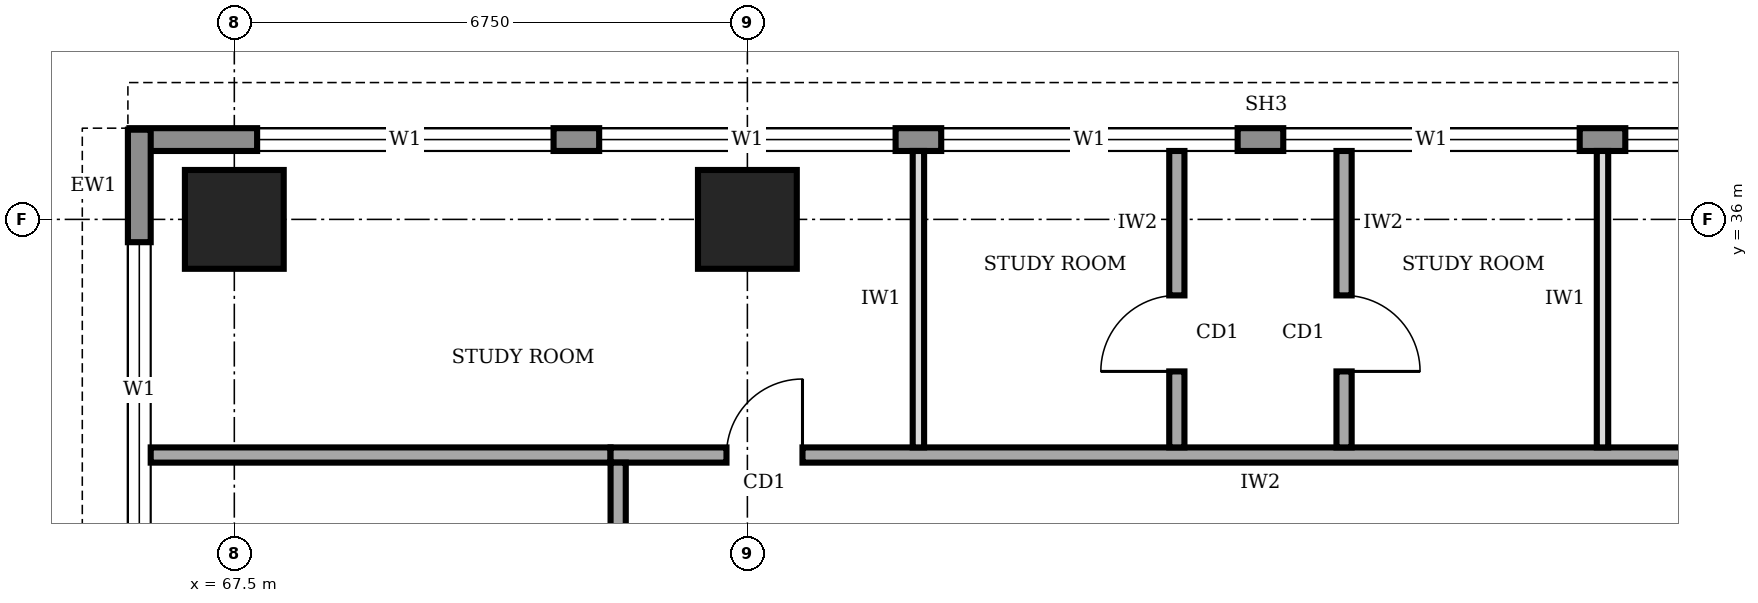
"""IFC4 building model, lengths in metres.
Left out: names, types, materials, properties, quantities, classifications, styles, units other than length and angle.
Written with IfcOpenShell. Run it as: python <this file> out.ifc"""

import sys

from ifc_helpers import new_model, si_unit, direction, frame, frame_2d, origin, origin_2d, place, context, subcontext, project, spatial, rectangle, extrude, element, fill, save


model = new_model("IFC4")
c1 = context("Model", 3, precision=1e-05, world=origin(), true_north=direction((0.0, 1.0)))
c2 = subcontext(c1, "Body", "Model", "MODEL_VIEW")
j1 = project(units=[si_unit("LENGTHUNIT", "METRE"), si_unit("PLANEANGLEUNIT", "RADIAN")], contexts=[c1])
p1 = place(None, origin())
s1 = spatial("IfcSite", under=j1, at=p1, CompositionType="ELEMENT")
p2 = place(p1, origin())
s2 = spatial("IfcBuilding", under=s1, at=p2, CompositionType="ELEMENT")
p3 = place(p2, frame((0.0, 0.0, 221.0)))
s3 = spatial("IfcBuildingStorey", under=s2, at=p3, CompositionType="ELEMENT", Elevation=221.0)
for number, where, z_axis, x_axis in (
    (1, (67.5, 36.0, 0.0), (0.0, 0.0, 1.0), (1.0, 0.0, 0.0)),
    (2, (74.25, 36.0, 0.0), (0.0, 0.0, 1.0), (1.0, 0.0, 0.0)),
):
    element("IfcColumn", number, at=place(p3, frame(where, z_axis=z_axis, x_axis=x_axis)), inside=s3, PredefinedType="COLUMN", context=c2, shape_type="SweptSolid", body=[
        extrude(rectangle(XDim=1.3, YDim=1.3, at=origin_2d()), origin(), (0.0, 0.0, 1.0), 4.0),
    ])
p4 = place(p3, frame((96.03, 37.05, 0.0), z_axis=(0.0, 0.0, 1.0), x_axis=(-1.0, 0.0, 0.0)))
e3 = element("IfcWall", 3, at=p4, inside=s3, PredefinedType="STANDARD", context=c2, shape_type="SweptSolid", body=[
    extrude(rectangle(XDim=29.91, YDim=0.3, at=frame_2d((14.955, 0.0))), origin(), (0.0, 0.0, 1.0), 3.75),
])
p5 = place(p4, frame((24.33, 0.0, 0.9)))
e4 = element("IfcOpeningElement", 4, at=p5, cuts=e3, PredefinedType="OPENING", context=c2, shape_type="SweptSolid", body=[
    extrude(rectangle(XDim=3.9, YDim=2.2, at=frame_2d((1.95, 1.1))), frame((0.0, 0.16, 0.0), z_axis=(0.0, -1.0, 0.0), x_axis=(1.0, 0.0, 0.0)), (0.0, 0.0, 1.0), 0.32),
])
p6 = place(p4, frame((19.83, 0.0, 0.9)))
e5 = element("IfcOpeningElement", 5, at=p6, cuts=e3, PredefinedType="OPENING", context=c2, shape_type="SweptSolid", body=[
    extrude(rectangle(XDim=3.9, YDim=2.2, at=frame_2d((1.95, 1.1))), frame((0.0, 0.16, 0.0), z_axis=(0.0, -1.0, 0.0), x_axis=(1.0, 0.0, 0.0)), (0.0, 0.0, 1.0), 0.32),
])
p7 = place(p4, frame((15.33, 0.0, 0.9)))
e6 = element("IfcOpeningElement", 6, at=p7, cuts=e3, PredefinedType="OPENING", context=c2, shape_type="SweptSolid", body=[
    extrude(rectangle(XDim=3.9, YDim=2.2, at=frame_2d((1.95, 1.1))), frame((0.0, 0.16, 0.0), z_axis=(0.0, -1.0, 0.0), x_axis=(1.0, 0.0, 0.0)), (0.0, 0.0, 1.0), 0.32),
])
p8 = place(p4, frame((10.83, 0.0, 0.9)))
e7 = element("IfcOpeningElement", 7, at=p8, cuts=e3, PredefinedType="OPENING", context=c2, shape_type="SweptSolid", body=[
    extrude(rectangle(XDim=3.9, YDim=2.2, at=frame_2d((1.95, 1.1))), frame((0.0, 0.16, 0.0), z_axis=(0.0, -1.0, 0.0), x_axis=(1.0, 0.0, 0.0)), (0.0, 0.0, 1.0), 0.32),
])
p9 = place(p4, frame((6.33, 0.0, 0.9)))
e8 = element("IfcOpeningElement", 8, at=p9, cuts=e3, PredefinedType="OPENING", context=c2, shape_type="SweptSolid", body=[
    extrude(rectangle(XDim=3.9, YDim=2.2, at=frame_2d((1.95, 1.1))), frame((0.0, 0.16, 0.0), z_axis=(0.0, -1.0, 0.0), x_axis=(1.0, 0.0, 0.0)), (0.0, 0.0, 1.0), 0.32),
])
p10 = place(p4, frame((1.83, 0.0, 0.9)))
e9 = element("IfcOpeningElement", 9, at=p10, cuts=e3, PredefinedType="OPENING", context=c2, shape_type="SweptSolid", body=[
    extrude(rectangle(XDim=3.9, YDim=2.2, at=frame_2d((1.95, 1.1))), frame((0.0, 0.16, 0.0), z_axis=(0.0, -1.0, 0.0), x_axis=(1.0, 0.0, 0.0)), (0.0, 0.0, 1.0), 0.32),
])
p11 = place(p3, frame((66.25, 37.18, 0.0), z_axis=(0.0, 0.0, 1.0), x_axis=(0.0, -1.0, 0.0)))
e10 = element("IfcWall", 10, at=p11, inside=s3, PredefinedType="STANDARD", context=c2, shape_type="SweptSolid", body=[
    extrude(rectangle(XDim=33.86, YDim=0.3, at=frame_2d((16.93, 0.0))), origin(), (0.0, 0.0, 1.0), 3.75),
])
p12 = place(p11, frame((28.48, 0.0, 0.9)))
e11 = element("IfcOpeningElement", 11, at=p12, cuts=e10, PredefinedType="OPENING", context=c2, shape_type="SweptSolid", body=[
    extrude(rectangle(XDim=3.9, YDim=2.2, at=frame_2d((1.95, 1.1))), frame((0.0, 0.16, 0.0), z_axis=(0.0, -1.0, 0.0), x_axis=(1.0, 0.0, 0.0)), (0.0, 0.0, 1.0), 0.32),
])
p13 = place(p11, frame((23.98, 0.0, 0.9)))
e12 = element("IfcOpeningElement", 12, at=p13, cuts=e10, PredefinedType="OPENING", context=c2, shape_type="SweptSolid", body=[
    extrude(rectangle(XDim=3.9, YDim=2.2, at=frame_2d((1.95, 1.1))), frame((0.0, 0.16, 0.0), z_axis=(0.0, -1.0, 0.0), x_axis=(1.0, 0.0, 0.0)), (0.0, 0.0, 1.0), 0.32),
])
p14 = place(p11, frame((19.48, 0.0, 0.9)))
e13 = element("IfcOpeningElement", 13, at=p14, cuts=e10, PredefinedType="OPENING", context=c2, shape_type="SweptSolid", body=[
    extrude(rectangle(XDim=3.9, YDim=2.2, at=frame_2d((1.95, 1.1))), frame((0.0, 0.16, 0.0), z_axis=(0.0, -1.0, 0.0), x_axis=(1.0, 0.0, 0.0)), (0.0, 0.0, 1.0), 0.32),
])
p15 = place(p11, frame((14.98, 0.0, 0.9)))
e14 = element("IfcOpeningElement", 14, at=p15, cuts=e10, PredefinedType="OPENING", context=c2, shape_type="SweptSolid", body=[
    extrude(rectangle(XDim=3.9, YDim=2.2, at=frame_2d((1.95, 1.1))), frame((0.0, 0.16, 0.0), z_axis=(0.0, -1.0, 0.0), x_axis=(1.0, 0.0, 0.0)), (0.0, 0.0, 1.0), 0.32),
])
p16 = place(p11, frame((10.48, 0.0, 0.9)))
e15 = element("IfcOpeningElement", 15, at=p16, cuts=e10, PredefinedType="OPENING", context=c2, shape_type="SweptSolid", body=[
    extrude(rectangle(XDim=3.9, YDim=2.2, at=frame_2d((1.95, 1.1))), frame((0.0, 0.16, 0.0), z_axis=(0.0, -1.0, 0.0), x_axis=(1.0, 0.0, 0.0)), (0.0, 0.0, 1.0), 0.32),
])
p17 = place(p11, frame((5.98, 0.0, 0.9)))
e16 = element("IfcOpeningElement", 16, at=p17, cuts=e10, PredefinedType="OPENING", context=c2, shape_type="SweptSolid", body=[
    extrude(rectangle(XDim=3.9, YDim=2.2, at=frame_2d((1.95, 1.1))), frame((0.0, 0.16, 0.0), z_axis=(0.0, -1.0, 0.0), x_axis=(1.0, 0.0, 0.0)), (0.0, 0.0, 1.0), 0.32),
])
p18 = place(p11, frame((1.48, 0.0, 0.9)))
e17 = element("IfcOpeningElement", 17, at=p18, cuts=e10, PredefinedType="OPENING", context=c2, shape_type="SweptSolid", body=[
    extrude(rectangle(XDim=3.9, YDim=2.2, at=frame_2d((1.95, 1.1))), frame((0.0, 0.16, 0.0), z_axis=(0.0, -1.0, 0.0), x_axis=(1.0, 0.0, 0.0)), (0.0, 0.0, 1.0), 0.32),
])
p19 = place(p3, frame((89.35, 32.9, 0.0), z_axis=(0.0, 0.0, 1.0), x_axis=(-1.0, 0.0, 0.0)))
e18 = element("IfcWall", 18, at=p19, inside=s3, PredefinedType="SOLIDWALL", context=c2, shape_type="SweptSolid", body=[
    extrude(rectangle(XDim=16.9, YDim=0.2, at=frame_2d((8.45, 0.0))), origin(), (0.0, 0.0, 1.0), 3.75),
])
p20 = place(p19, frame((14.375, 0.0, 0.0)))
e19 = element("IfcOpeningElement", 19, at=p20, cuts=e18, PredefinedType="OPENING", context=c2, shape_type="SweptSolid", body=[
    extrude(rectangle(XDim=1.0, YDim=2.1, at=frame_2d((0.5, 1.05))), frame((0.0, 0.11, 0.0), z_axis=(0.0, -1.0, 0.0), x_axis=(1.0, 0.0, 0.0)), (0.0, 0.0, 1.0), 0.22),
])
p21 = place(p19, frame((1.325, 0.0, 0.0)))
e20 = element("IfcOpeningElement", 20, at=p21, cuts=e18, PredefinedType="OPENING", context=c2, shape_type="SweptSolid", body=[
    extrude(rectangle(XDim=1.0, YDim=2.1, at=frame_2d((0.5, 1.05))), frame((0.0, 0.11, 0.0), z_axis=(0.0, -1.0, 0.0), x_axis=(1.0, 0.0, 0.0)), (0.0, 0.0, 1.0), 0.22),
])
p22 = place(p3, frame((72.55, 32.8, 0.0), z_axis=(0.0, 0.0, 1.0), x_axis=(0.0, -1.0, 0.0)))
e21 = element("IfcWall", 21, at=p22, inside=s3, PredefinedType="SOLIDWALL", context=c2, shape_type="SweptSolid", body=[
    extrude(rectangle(XDim=23.8, YDim=0.2, at=frame_2d((11.9, 0.0))), origin(), (0.0, 0.0, 1.0), 3.75),
])
p23 = place(p22, frame((21.05, 0.0, 0.0)))
e22 = element("IfcOpeningElement", 22, at=p23, cuts=e21, PredefinedType="OPENING", context=c2, shape_type="SweptSolid", body=[
    extrude(rectangle(XDim=1.0, YDim=2.1, at=frame_2d((0.5, 1.05))), frame((0.0, 0.11, 0.0), z_axis=(0.0, -1.0, 0.0), x_axis=(1.0, 0.0, 0.0)), (0.0, 0.0, 1.0), 0.22),
])
p24 = place(p22, frame((14.3, 0.0, 0.0)))
e23 = element("IfcOpeningElement", 23, at=p24, cuts=e21, PredefinedType="OPENING", context=c2, shape_type="SweptSolid", body=[
    extrude(rectangle(XDim=1.0, YDim=2.1, at=frame_2d((0.5, 1.05))), frame((0.0, 0.11, 0.0), z_axis=(0.0, -1.0, 0.0), x_axis=(1.0, 0.0, 0.0)), (0.0, 0.0, 1.0), 0.22),
])
p25 = place(p22, frame((7.55, 0.0, 0.0)))
e24 = element("IfcOpeningElement", 24, at=p25, cuts=e21, PredefinedType="OPENING", context=c2, shape_type="SweptSolid", body=[
    extrude(rectangle(XDim=1.0, YDim=2.1, at=frame_2d((0.5, 1.05))), frame((0.0, 0.11, 0.0), z_axis=(0.0, -1.0, 0.0), x_axis=(1.0, 0.0, 0.0)), (0.0, 0.0, 1.0), 0.22),
])
p26 = place(p22, frame((2.3, 0.0, 0.0)))
e25 = element("IfcOpeningElement", 25, at=p26, cuts=e21, PredefinedType="OPENING", context=c2, shape_type="SweptSolid", body=[
    extrude(rectangle(XDim=1.0, YDim=2.1, at=frame_2d((0.5, 1.05))), frame((0.0, 0.11, 0.0), z_axis=(0.0, -1.0, 0.0), x_axis=(1.0, 0.0, 0.0)), (0.0, 0.0, 1.0), 0.22),
])
p27 = place(p3, frame((79.9, 33.0, 0.0), z_axis=(0.0, 0.0, 1.0), x_axis=(0.0, 1.0, 0.0)))
e26 = element("IfcWall", 26, at=p27, inside=s3, PredefinedType="SOLIDWALL", context=c2, shape_type="SweptSolid", body=[
    extrude(rectangle(XDim=3.9, YDim=0.2, at=frame_2d((1.95, 0.0))), origin(), (0.0, 0.0, 1.0), 3.75),
])
p28 = place(p27, frame((1.0, 0.0, 0.0)))
e27 = element("IfcOpeningElement", 27, at=p28, cuts=e26, PredefinedType="OPENING", context=c2, shape_type="SweptSolid", body=[
    extrude(rectangle(XDim=1.0, YDim=2.1, at=frame_2d((0.5, 1.05))), frame((0.0, 0.11, 0.0), z_axis=(0.0, -1.0, 0.0), x_axis=(1.0, 0.0, 0.0)), (0.0, 0.0, 1.0), 0.22),
])
p29 = place(p3, frame((82.1, 36.9, 0.0), z_axis=(0.0, 0.0, 1.0), x_axis=(0.0, -1.0, 0.0)))
e28 = element("IfcWall", 28, at=p29, inside=s3, PredefinedType="SOLIDWALL", context=c2, shape_type="SweptSolid", body=[
    extrude(rectangle(XDim=3.9, YDim=0.2, at=frame_2d((1.95, 0.0))), origin(), (0.0, 0.0, 1.0), 3.75),
])
p30 = place(p29, frame((1.9, 0.0, 0.0)))
e29 = element("IfcOpeningElement", 29, at=p30, cuts=e28, PredefinedType="OPENING", context=c2, shape_type="SweptSolid", body=[
    extrude(rectangle(XDim=1.0, YDim=2.1, at=frame_2d((0.5, 1.05))), frame((0.0, 0.11, 0.0), z_axis=(0.0, -1.0, 0.0), x_axis=(1.0, 0.0, 0.0)), (0.0, 0.0, 1.0), 0.22),
])
p31 = place(p3, frame((66.4, 32.9, 0.0), z_axis=(0.0, 0.0, 1.0), x_axis=(1.0, 0.0, 0.0)))
e30 = element("IfcWall", 30, at=p31, inside=s3, PredefinedType="SOLIDWALL", context=c2, shape_type="SweptSolid", body=[
    extrude(rectangle(XDim=6.05, YDim=0.2, at=frame_2d((3.025, 0.0))), origin(), (0.0, 0.0, 1.0), 3.75),
])
for number, where, z_axis, x_axis in (
    (31, (76.5, 33.0, 0.0), (0.0, 0.0, 1.0), (0.0, 1.0, 0.0)),
    (32, (85.5, 33.0, 0.0), (0.0, 0.0, 1.0), (0.0, 1.0, 0.0)),
):
    element("IfcWall", number, at=place(p3, frame(where, z_axis=z_axis, x_axis=x_axis)), inside=s3, PredefinedType="PARTITIONING", context=c2, shape_type="SweptSolid", body=[
        extrude(rectangle(XDim=3.9, YDim=0.15, at=frame_2d((1.95, 0.0))), origin(), (0.0, 0.0, 1.0), 3.75),
    ])
p32 = place(p5, origin())
e33 = element("IfcWindow", 33, at=p32, inside=s3, PartitioningType="SINGLE_PANEL", PredefinedType="WINDOW", context=c2, shape_type="SweptSolid", body=[
    extrude(rectangle(XDim=3.9, YDim=2.2, at=frame_2d((1.95, 1.1))), frame((0.0, 0.03, 0.0), z_axis=(0.0, -1.0, 0.0), x_axis=(1.0, 0.0, 0.0)), (0.0, 0.0, 1.0), 0.06),
])
fill(e4, e33)
p33 = place(p6, origin())
e34 = element("IfcWindow", 34, at=p33, inside=s3, PartitioningType="SINGLE_PANEL", PredefinedType="WINDOW", context=c2, shape_type="SweptSolid", body=[
    extrude(rectangle(XDim=3.9, YDim=2.2, at=frame_2d((1.95, 1.1))), frame((0.0, 0.03, 0.0), z_axis=(0.0, -1.0, 0.0), x_axis=(1.0, 0.0, 0.0)), (0.0, 0.0, 1.0), 0.06),
])
fill(e5, e34)
p34 = place(p7, origin())
e35 = element("IfcWindow", 35, at=p34, inside=s3, PartitioningType="SINGLE_PANEL", PredefinedType="WINDOW", context=c2, shape_type="SweptSolid", body=[
    extrude(rectangle(XDim=3.9, YDim=2.2, at=frame_2d((1.95, 1.1))), frame((0.0, 0.03, 0.0), z_axis=(0.0, -1.0, 0.0), x_axis=(1.0, 0.0, 0.0)), (0.0, 0.0, 1.0), 0.06),
])
fill(e6, e35)
p35 = place(p8, origin())
e36 = element("IfcWindow", 36, at=p35, inside=s3, PartitioningType="SINGLE_PANEL", PredefinedType="WINDOW", context=c2, shape_type="SweptSolid", body=[
    extrude(rectangle(XDim=3.9, YDim=2.2, at=frame_2d((1.95, 1.1))), frame((0.0, 0.03, 0.0), z_axis=(0.0, -1.0, 0.0), x_axis=(1.0, 0.0, 0.0)), (0.0, 0.0, 1.0), 0.06),
])
fill(e7, e36)
p36 = place(p9, origin())
e37 = element("IfcWindow", 37, at=p36, inside=s3, PartitioningType="SINGLE_PANEL", PredefinedType="WINDOW", context=c2, shape_type="SweptSolid", body=[
    extrude(rectangle(XDim=3.9, YDim=2.2, at=frame_2d((1.95, 1.1))), frame((0.0, 0.03, 0.0), z_axis=(0.0, -1.0, 0.0), x_axis=(1.0, 0.0, 0.0)), (0.0, 0.0, 1.0), 0.06),
])
fill(e8, e37)
p37 = place(p18, origin())
e38 = element("IfcWindow", 38, at=p37, inside=s3, PartitioningType="SINGLE_PANEL", PredefinedType="WINDOW", context=c2, shape_type="SweptSolid", body=[
    extrude(rectangle(XDim=3.9, YDim=2.2, at=frame_2d((1.95, 1.1))), frame((0.0, 0.03, 0.0), z_axis=(0.0, -1.0, 0.0), x_axis=(1.0, 0.0, 0.0)), (0.0, 0.0, 1.0), 0.06),
])
fill(e17, e38)
p38 = place(p20, frame((1.0, 0.0, 0.0), z_axis=(0.0, 0.0, 1.0), x_axis=(-1.0, 0.0, 0.0)))
e39 = element("IfcDoor", 39, at=p38, inside=s3, OperationType="SINGLE_SWING_RIGHT", PredefinedType="DOOR", context=c2, shape_type="SweptSolid", body=[
    extrude(rectangle(XDim=1.0, YDim=2.1, at=frame_2d((0.5, 1.05))), frame((0.0, 0.025, 0.0), z_axis=(0.0, -1.0, 0.0), x_axis=(1.0, 0.0, 0.0)), (0.0, 0.0, 1.0), 0.05),
])
fill(e19, e39)
p39 = place(p28, origin())
e40 = element("IfcDoor", 40, at=p39, inside=s3, OperationType="SINGLE_SWING_LEFT", PredefinedType="DOOR", context=c2, shape_type="SweptSolid", body=[
    extrude(rectangle(XDim=1.0, YDim=2.1, at=frame_2d((0.5, 1.05))), frame((0.0, 0.025, 0.0), z_axis=(0.0, -1.0, 0.0), x_axis=(1.0, 0.0, 0.0)), (0.0, 0.0, 1.0), 0.05),
])
fill(e27, e40)
p40 = place(p30, origin())
e41 = element("IfcDoor", 41, at=p40, inside=s3, OperationType="SINGLE_SWING_RIGHT", PredefinedType="DOOR", context=c2, shape_type="SweptSolid", body=[
    extrude(rectangle(XDim=1.0, YDim=2.1, at=frame_2d((0.5, 1.05))), frame((0.0, 0.025, 0.0), z_axis=(0.0, -1.0, 0.0), x_axis=(1.0, 0.0, 0.0)), (0.0, 0.0, 1.0), 0.05),
])
fill(e29, e41)
save(model, sys.argv[1])
